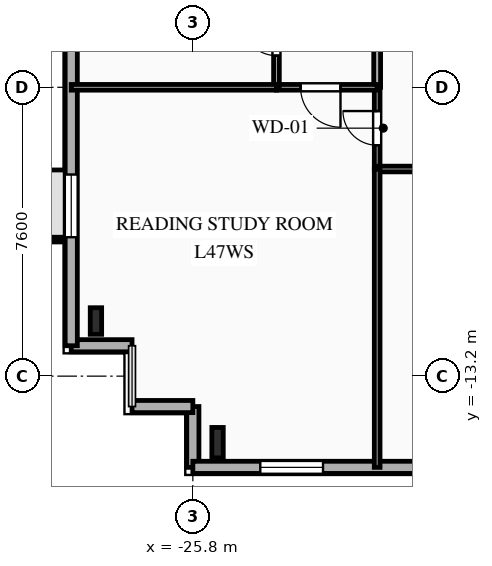
"""IFC4 building model, lengths in metres.
Left out: names, types, materials, properties, quantities, classifications, styles, units other than length and angle.
Written with IfcOpenShell. Run it as: python <this file> out.ifc"""

import sys

from ifc_helpers import new_model, si_unit, direction, frame, frame_2d, origin, origin_2d, place, context, subcontext, project, spatial, rectangle, i_section, extrude, element, fill, save


model = new_model("IFC4")
c1 = context("Model", 3, precision=1e-05, world=origin(), true_north=direction((0.0, 1.0)))
c2 = subcontext(c1, "Body", "Model", "MODEL_VIEW")
j1 = project(units=[si_unit("LENGTHUNIT", "METRE"), si_unit("PLANEANGLEUNIT", "RADIAN")], contexts=[c1])
p1 = place(None, origin())
s1 = spatial("IfcSite", under=j1, at=p1, CompositionType="ELEMENT")
p2 = place(p1, origin())
s2 = spatial("IfcBuilding", under=s1, at=p2, CompositionType="ELEMENT")
p3 = place(p2, frame((0.0, 0.0, 167.85)))
s3 = spatial("IfcBuildingStorey", under=s2, at=p3, CompositionType="ELEMENT", Elevation=167.85)
p4 = place(p3, frame((-25.15, -14.95, 0.0), z_axis=(0.0, 0.0, 1.0), x_axis=(1.0, 0.0, 0.0)))
e1 = element("IfcColumn", 1, at=p4, inside=s3, PredefinedType="COLUMN", context=c2, shape_type="SweptSolid", body=[
    extrude(i_section(OverallWidth=0.3, OverallDepth=0.8, WebThickness=0.018, FlangeThickness=0.033, FilletRadius=0.03, at=origin_2d()), origin(), (0.0, 0.0, 1.0), 3.35),
])
p5 = place(p3, frame((-28.35, -11.75, 0.0), z_axis=(0.0, 0.0, 1.0), x_axis=(1.0, 0.0, 0.0)))
e2 = element("IfcColumn", 2, at=p5, inside=s3, PredefinedType="COLUMN", context=c2, shape_type="SweptSolid", body=[
    extrude(i_section(OverallWidth=0.3, OverallDepth=0.7, WebThickness=0.017, FlangeThickness=0.032, FilletRadius=0.027, at=origin_2d()), origin(), (0.0, 0.0, 1.0), 3.35),
])
p6 = place(p3, frame((-25.8, -15.6, 0.0), z_axis=(0.0, 0.0, 1.0), x_axis=(0.0, 1.0, 0.0)))
e3 = element("IfcWall", 3, at=p6, inside=s3, PredefinedType="SOLIDWALL", context=c2, shape_type="SweptSolid", body=[
    extrude(rectangle(XDim=1.6, YDim=0.32, at=frame_2d((0.8, 0.0))), origin(), (0.0, 0.0, 1.0), 3.04),
])
p7 = place(p3, frame((-25.8, -14.0, 0.0), z_axis=(0.0, 0.0, 1.0), x_axis=(-1.0, 0.0, 0.0)))
e4 = element("IfcWall", 4, at=p7, inside=s3, PredefinedType="SOLIDWALL", context=c2, shape_type="SweptSolid", body=[
    extrude(rectangle(XDim=1.6, YDim=0.32, at=frame_2d((0.8, 0.0))), origin(), (0.0, 0.0, 1.0), 3.04),
])
p8 = place(p3, frame((-27.4, -12.4, 0.0), z_axis=(0.0, 0.0, 1.0), x_axis=(-1.0, 0.0, 0.0)))
e5 = element("IfcWall", 5, at=p8, inside=s3, PredefinedType="SOLIDWALL", context=c2, shape_type="SweptSolid", body=[
    extrude(rectangle(XDim=1.6, YDim=0.32, at=frame_2d((0.8, 0.0))), origin(), (0.0, 0.0, 1.0), 3.04),
])
p9 = place(p3, frame((-29.0, -12.4, 0.0), z_axis=(0.0, 0.0, 1.0), x_axis=(0.0, 1.0, 0.0)))
e6 = element("IfcWall", 6, at=p9, inside=s3, PredefinedType="SOLIDWALL", context=c2, shape_type="SweptSolid", body=[
    extrude(rectangle(XDim=29.6, YDim=0.32, at=frame_2d((14.8, 0.0))), origin(), (0.0, 0.0, 1.0), 3.04),
])
p10 = place(p9, frame((2.855, 0.0, 0.85)))
e7 = element("IfcOpeningElement", 7, at=p10, cuts=e6, PredefinedType="OPENING", context=c2, shape_type="SweptSolid", body=[
    extrude(rectangle(XDim=1.65, YDim=1.85, at=frame_2d((0.825, 0.925))), frame((0.0, 0.17, 0.0), z_axis=(0.0, -1.0, 0.0), x_axis=(1.0, 0.0, 0.0)), (0.0, 0.0, 1.0), 0.34),
])
p11 = place(p9, frame((9.865, 0.0, 0.85)))
e8 = element("IfcOpeningElement", 8, at=p11, cuts=e6, PredefinedType="OPENING", context=c2, shape_type="SweptSolid", body=[
    extrude(rectangle(XDim=1.95, YDim=1.85, at=frame_2d((0.975, 0.925))), frame((0.0, 0.17, 0.0), z_axis=(0.0, -1.0, 0.0), x_axis=(1.0, 0.0, 0.0)), (0.0, 0.0, 1.0), 0.34),
])
p12 = place(p9, frame((13.08, 0.0, 0.85)))
e9 = element("IfcOpeningElement", 9, at=p12, cuts=e6, PredefinedType="OPENING", context=c2, shape_type="SweptSolid", body=[
    extrude(rectangle(XDim=1.6, YDim=1.85, at=frame_2d((0.8, 0.925))), frame((0.0, 0.17, 0.0), z_axis=(0.0, -1.0, 0.0), x_axis=(1.0, 0.0, 0.0)), (0.0, 0.0, 1.0), 0.34),
])
p13 = place(p9, frame((15.88, 0.0, 0.85)))
e10 = element("IfcOpeningElement", 10, at=p13, cuts=e6, PredefinedType="OPENING", context=c2, shape_type="SweptSolid", body=[
    extrude(rectangle(XDim=1.6, YDim=1.85, at=frame_2d((0.8, 0.925))), frame((0.0, 0.17, 0.0), z_axis=(0.0, -1.0, 0.0), x_axis=(1.0, 0.0, 0.0)), (0.0, 0.0, 1.0), 0.34),
])
p14 = place(p9, frame((18.72, 0.0, 0.85)))
e11 = element("IfcOpeningElement", 11, at=p14, cuts=e6, PredefinedType="OPENING", context=c2, shape_type="SweptSolid", body=[
    extrude(rectangle(XDim=1.6, YDim=1.85, at=frame_2d((0.8, 0.925))), frame((0.0, 0.17, 0.0), z_axis=(0.0, -1.0, 0.0), x_axis=(1.0, 0.0, 0.0)), (0.0, 0.0, 1.0), 0.34),
])
p15 = place(p9, frame((24.255, 0.0, 0.85)))
e12 = element("IfcOpeningElement", 12, at=p15, cuts=e6, PredefinedType="OPENING", context=c2, shape_type="SweptSolid", body=[
    extrude(rectangle(XDim=1.65, YDim=1.85, at=frame_2d((0.825, 0.925))), frame((0.0, 0.17, 0.0), z_axis=(0.0, -1.0, 0.0), x_axis=(1.0, 0.0, 0.0)), (0.0, 0.0, 1.0), 0.34),
])
p16 = place(p3, frame((23.8, -15.6, 0.0), z_axis=(0.0, 0.0, 1.0), x_axis=(-1.0, 0.0, 0.0)))
e13 = element("IfcWall", 13, at=p16, inside=s3, PredefinedType="SOLIDWALL", context=c2, shape_type="SweptSolid", body=[
    extrude(rectangle(XDim=49.6, YDim=0.32, at=frame_2d((24.8, 0.0))), origin(), (0.0, 0.0, 1.0), 3.04),
])
p17 = place(p16, frame((1.13, 0.0, 0.85)))
e14 = element("IfcOpeningElement", 14, at=p17, cuts=e13, PredefinedType="OPENING", context=c2, shape_type="SweptSolid", body=[
    extrude(rectangle(XDim=1.1, YDim=1.85, at=frame_2d((0.55, 0.925))), frame((0.0, 0.17, 0.0), z_axis=(0.0, -1.0, 0.0), x_axis=(1.0, 0.0, 0.0)), (0.0, 0.0, 1.0), 0.34),
])
p18 = place(p16, frame((5.695, 0.0, 0.85)))
e15 = element("IfcOpeningElement", 15, at=p18, cuts=e13, PredefinedType="OPENING", context=c2, shape_type="SweptSolid", body=[
    extrude(rectangle(XDim=1.65, YDim=1.85, at=frame_2d((0.825, 0.925))), frame((0.0, 0.17, 0.0), z_axis=(0.0, -1.0, 0.0), x_axis=(1.0, 0.0, 0.0)), (0.0, 0.0, 1.0), 0.34),
])
p19 = place(p16, frame((12.975, 0.0, 0.85)))
e16 = element("IfcOpeningElement", 16, at=p19, cuts=e13, PredefinedType="OPENING", context=c2, shape_type="SweptSolid", body=[
    extrude(rectangle(XDim=1.65, YDim=1.85, at=frame_2d((0.825, 0.925))), frame((0.0, 0.17, 0.0), z_axis=(0.0, -1.0, 0.0), x_axis=(1.0, 0.0, 0.0)), (0.0, 0.0, 1.0), 0.34),
])
p20 = place(p16, frame((21.636, 0.0, 0.85)))
e17 = element("IfcOpeningElement", 17, at=p20, cuts=e13, PredefinedType="OPENING", context=c2, shape_type="SweptSolid", body=[
    extrude(rectangle(XDim=2.2, YDim=1.85, at=frame_2d((1.1, 0.925))), frame((0.0, 0.17, 0.0), z_axis=(0.0, -1.0, 0.0), x_axis=(1.0, 0.0, 0.0)), (0.0, 0.0, 1.0), 0.34),
])
p21 = place(p16, frame((33.935, 0.0, 0.85)))
e18 = element("IfcOpeningElement", 18, at=p21, cuts=e13, PredefinedType="OPENING", context=c2, shape_type="SweptSolid", body=[
    extrude(rectangle(XDim=1.65, YDim=1.85, at=frame_2d((0.825, 0.925))), frame((0.0, 0.17, 0.0), z_axis=(0.0, -1.0, 0.0), x_axis=(1.0, 0.0, 0.0)), (0.0, 0.0, 1.0), 0.34),
])
p22 = place(p16, frame((41.24, 0.0, 0.85)))
e19 = element("IfcOpeningElement", 19, at=p22, cuts=e13, PredefinedType="OPENING", context=c2, shape_type="SweptSolid", body=[
    extrude(rectangle(XDim=1.65, YDim=1.85, at=frame_2d((0.825, 0.925))), frame((0.0, 0.17, 0.0), z_axis=(0.0, -1.0, 0.0), x_axis=(1.0, 0.0, 0.0)), (0.0, 0.0, 1.0), 0.34),
])
p23 = place(p16, frame((46.175, 0.0, 0.85)))
e20 = element("IfcOpeningElement", 20, at=p23, cuts=e13, PredefinedType="OPENING", context=c2, shape_type="SweptSolid", body=[
    extrude(rectangle(XDim=1.65, YDim=1.85, at=frame_2d((0.825, 0.925))), frame((0.0, 0.17, 0.0), z_axis=(0.0, -1.0, 0.0), x_axis=(1.0, 0.0, 0.0)), (0.0, 0.0, 1.0), 0.34),
])
p24 = place(p3, frame((-20.95, -7.75, 0.0), z_axis=(0.0, 0.0, 1.0), x_axis=(0.0, 1.0, 0.0)))
e21 = element("IfcWall", 21, at=p24, inside=s3, PredefinedType="PARTITIONING", context=c2, shape_type="SweptSolid", body=[
    extrude(rectangle(XDim=2.15, YDim=0.15, at=frame_2d((1.075, 0.0))), origin(), (0.0, 0.0, 1.0), 3.04),
])
p25 = place(p24, frame((0.625, 0.0, 0.0)))
e22 = element("IfcOpeningElement", 22, at=p25, cuts=e21, PredefinedType="OPENING", context=c2, shape_type="SweptSolid", body=[
    extrude(rectangle(XDim=0.9, YDim=2.1, at=frame_2d((0.45, 1.05))), frame((0.0, 0.085, 0.0), z_axis=(0.0, -1.0, 0.0), x_axis=(1.0, 0.0, 0.0)), (0.0, 0.0, 1.0), 0.17),
])
p26 = place(p3, frame((-14.267, -7.75, 0.0), z_axis=(0.0, 0.0, 1.0), x_axis=(-1.0, 0.0, 0.0)))
e23 = element("IfcWall", 23, at=p26, inside=s3, PredefinedType="PARTITIONING", context=c2, shape_type="SweptSolid", body=[
    extrude(rectangle(XDim=6.683, YDim=0.15, at=frame_2d((3.342, 0.0))), origin(), (0.0, 0.0, 1.0), 3.04),
])
p27 = place(p26, frame((1.139, 0.0, 0.0)))
e24 = element("IfcOpeningElement", 24, at=p27, cuts=e23, PredefinedType="OPENING", context=c2, shape_type="SweptSolid", body=[
    extrude(rectangle(XDim=1.05, YDim=2.15, at=frame_2d((0.525, 1.075))), frame((0.0, 0.085, 0.0), z_axis=(0.0, -1.0, 0.0), x_axis=(1.0, 0.0, 0.0)), (0.0, 0.0, 1.0), 0.17),
])
p28 = place(p3, frame((-20.95, -5.6, 0.0), z_axis=(0.0, 0.0, 1.0), x_axis=(0.0, 1.0, 0.0)))
e25 = element("IfcWall", 25, at=p28, inside=s3, PredefinedType="PARTITIONING", context=c2, shape_type="SweptSolid", body=[
    extrude(rectangle(XDim=14.1, YDim=0.18, at=frame_2d((7.05, 0.0))), origin(), (0.0, 0.0, 1.0), 3.04),
])
p29 = place(p28, frame((5.058, 0.0, 0.0)))
e26 = element("IfcOpeningElement", 26, at=p29, cuts=e25, PredefinedType="OPENING", context=c2, shape_type="SweptSolid", body=[
    extrude(rectangle(XDim=1.0, YDim=2.15, at=frame_2d((0.5, 1.075))), frame((0.0, 0.1, 0.0), z_axis=(0.0, -1.0, 0.0), x_axis=(1.0, 0.0, 0.0)), (0.0, 0.0, 1.0), 0.2),
])
p30 = place(p3, frame((-20.95, -5.6, 0.0), z_axis=(0.0, 0.0, 1.0), x_axis=(-1.0, 0.0, 0.0)))
e27 = element("IfcWall", 27, at=p30, inside=s3, PredefinedType="PARTITIONING", context=c2, shape_type="SweptSolid", body=[
    extrude(rectangle(XDim=2.65, YDim=0.15, at=frame_2d((1.325, 0.0))), origin(), (0.0, 0.0, 1.0), 3.04),
])
p31 = place(p30, frame((0.965, 0.0, 0.0)))
e28 = element("IfcOpeningElement", 28, at=p31, cuts=e27, PredefinedType="OPENING", context=c2, shape_type="SweptSolid", body=[
    extrude(rectangle(XDim=1.05, YDim=2.15, at=frame_2d((0.525, 1.075))), frame((0.0, 0.085, 0.0), z_axis=(0.0, -1.0, 0.0), x_axis=(1.0, 0.0, 0.0)), (0.0, 0.0, 1.0), 0.17),
])
p32 = place(p3, frame((-23.6, -5.6, 0.0), z_axis=(0.0, 0.0, 1.0), x_axis=(0.0, 1.0, 0.0)))
e29 = element("IfcWall", 29, at=p32, inside=s3, PredefinedType="PLUMBINGWALL", context=c2, shape_type="SweptSolid", body=[
    extrude(rectangle(XDim=2.35, YDim=0.15, at=frame_2d((1.175, 0.0))), origin(), (0.0, 0.0, 1.0), 2.695),
])
p33 = place(p32, frame((0.834, 0.0, 0.0)))
e30 = element("IfcOpeningElement", 30, at=p33, cuts=e29, PredefinedType="OPENING", context=c2, shape_type="SweptSolid", body=[
    extrude(rectangle(XDim=0.9, YDim=2.1, at=frame_2d((0.45, 1.05))), frame((0.0, 0.085, 0.0), z_axis=(0.0, -1.0, 0.0), x_axis=(1.0, 0.0, 0.0)), (0.0, 0.0, 1.0), 0.17),
])
p34 = place(p3, frame((-29.0, -5.6, 0.0), z_axis=(0.0, 0.0, 1.0), x_axis=(1.0, 0.0, 0.0)))
e31 = element("IfcWall", 31, at=p34, inside=s3, PredefinedType="PLUMBINGWALL", context=c2, shape_type="SweptSolid", body=[
    extrude(rectangle(XDim=5.4, YDim=0.15, at=frame_2d((2.7, 0.0))), origin(), (0.0, 0.0, 1.0), 3.04),
])
p35 = place(p3, frame((-20.95, -7.75, 0.0), z_axis=(0.0, 0.0, 1.0), x_axis=(0.0, -1.0, 0.0)))
e32 = element("IfcWall", 32, at=p35, inside=s3, PredefinedType="PARTITIONING", context=c2, shape_type="SweptSolid", body=[
    extrude(rectangle(XDim=7.85, YDim=0.15, at=frame_2d((3.925, 0.0))), origin(), (0.0, 0.0, 1.0), 3.04),
])
p36 = place(p10, origin())
e33 = element("IfcWindow", 33, at=p36, inside=s3, PartitioningType="SINGLE_PANEL", PredefinedType="WINDOW", context=c2, shape_type="SweptSolid", body=[
    extrude(rectangle(XDim=1.65, YDim=1.85, at=frame_2d((0.825, 0.925))), frame((0.0, 0.03, 0.0), z_axis=(0.0, -1.0, 0.0), x_axis=(1.0, 0.0, 0.0)), (0.0, 0.0, 1.0), 0.06),
])
fill(e7, e33)
p37 = place(p23, origin())
e34 = element("IfcWindow", 34, at=p37, inside=s3, PartitioningType="SINGLE_PANEL", PredefinedType="WINDOW", context=c2, shape_type="SweptSolid", body=[
    extrude(rectangle(XDim=1.65, YDim=1.85, at=frame_2d((0.825, 0.925))), frame((0.0, 0.03, 0.0), z_axis=(0.0, -1.0, 0.0), x_axis=(1.0, 0.0, 0.0)), (0.0, 0.0, 1.0), 0.06),
])
fill(e20, e34)
p38 = place(p25, origin())
e35 = element("IfcDoor", 35, at=p38, inside=s3, OperationType="SINGLE_SWING_RIGHT", PredefinedType="DOOR", context=c2, shape_type="SweptSolid", body=[
    extrude(rectangle(XDim=0.9, YDim=2.1, at=frame_2d((0.45, 1.05))), frame((0.0, 0.025, 0.0), z_axis=(0.0, -1.0, 0.0), x_axis=(1.0, 0.0, 0.0)), (0.0, 0.0, 1.0), 0.05),
])
fill(e22, e35)
p39 = place(p31, origin())
e36 = element("IfcDoor", 36, at=p39, inside=s3, OperationType="SINGLE_SWING_LEFT", PredefinedType="DOOR", context=c2, shape_type="SweptSolid", body=[
    extrude(rectangle(XDim=1.05, YDim=2.15, at=frame_2d((0.525, 1.075))), frame((0.0, 0.025, 0.0), z_axis=(0.0, -1.0, 0.0), x_axis=(1.0, 0.0, 0.0)), (0.0, 0.0, 1.0), 0.05),
])
fill(e28, e36)
p40 = place(p33, origin())
e37 = element("IfcDoor", 37, at=p40, inside=s3, OperationType="SINGLE_SWING_RIGHT", PredefinedType="DOOR", context=c2, shape_type="SweptSolid", body=[
    extrude(rectangle(XDim=0.9, YDim=2.1, at=frame_2d((0.45, 1.05))), frame((0.0, 0.025, 0.0), z_axis=(0.0, -1.0, 0.0), x_axis=(1.0, 0.0, 0.0)), (0.0, 0.0, 1.0), 0.05),
])
fill(e30, e37)
save(model, sys.argv[1])
